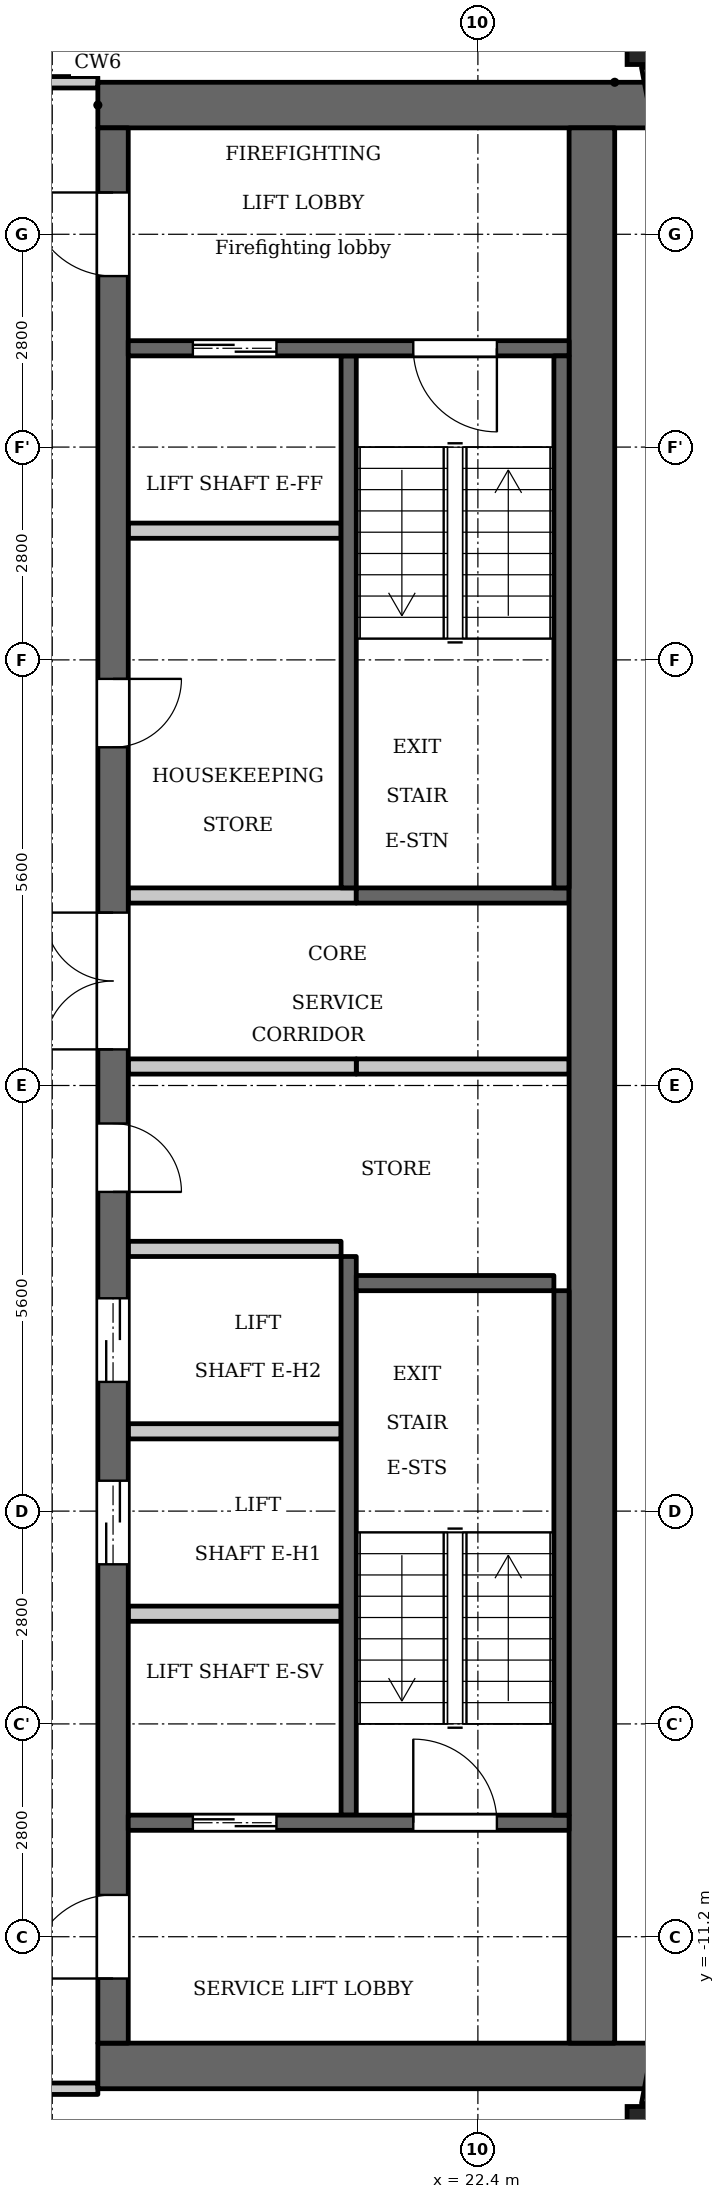
"""IFC4 building model, lengths in metres.
Left out: names, types, materials, properties, quantities, classifications, styles, units other than length and angle.
Written with IfcOpenShell. Run it as: python <this file> out.ifc"""

import sys

from ifc_helpers import new_model, si_unit, direction, frame, frame_2d, origin, origin_2d, place, context, subcontext, project, spatial, rectangle, extrude, element, fill, save


model = new_model("IFC4")
c1 = context("Model", 3, precision=1e-05, world=origin(), true_north=direction((0.0, 1.0)))
c2 = subcontext(c1, "Body", "Model", "MODEL_VIEW")
j1 = project(units=[si_unit("LENGTHUNIT", "METRE"), si_unit("PLANEANGLEUNIT", "RADIAN")], contexts=[c1])
p1 = place(None, origin())
s1 = spatial("IfcSite", under=j1, at=p1, CompositionType="ELEMENT")
p2 = place(p1, origin())
s2 = spatial("IfcBuilding", under=s1, at=p2, CompositionType="ELEMENT")
p3 = place(p2, frame((0.0, 0.0, 269.7)))
s3 = spatial("IfcBuildingStorey", under=s2, at=p3, CompositionType="ELEMENT", Elevation=269.7)
for number, where, z_axis, x_axis in (
    (1, (24.738, -13.809, 0.0), (0.0, 0.0, 1.0), (1.0, 0.0, 0.0)),
    (2, (24.738, 13.809, 0.0), (0.0, 0.0, 1.0), (1.0, 0.0, 0.0)),
):
    element("IfcColumn", number, at=place(p3, frame(where, z_axis=z_axis, x_axis=x_axis)), inside=s3, PredefinedType="COLUMN", context=c2, shape_type="SweptSolid", body=[
        extrude(rectangle(XDim=0.75, YDim=0.75, at=origin_2d()), origin(), (0.0, 0.0, 1.0), 3.5),
    ])
for number, where, z_axis, x_axis in (
    (3, (24.7, -13.42, 0.0), (0.0, 0.0, 1.0), (0.187, 0.982, 0.0)),
    (4, (25.053, 11.572, 0.0), (0.0, 0.0, 1.0), (-0.187, 0.982, 0.0)),
):
    element("IfcWall", number, at=place(p3, frame(where, z_axis=z_axis, x_axis=x_axis)), inside=s3, PredefinedType="SOLIDWALL", context=c2, shape_type="SweptSolid", body=[
        extrude(rectangle(XDim=1.881, YDim=0.3, at=frame_2d((0.941, 0.0))), origin(), (0.0, 0.0, 1.0), 2.55),
    ])
p4 = place(p3, frame((20.7, 2.6, 0.0), z_axis=(0.0, 0.0, 1.0), x_axis=(0.0, 1.0, 0.0)))
e5 = element("IfcWall", 5, at=p4, inside=s3, PredefinedType="SHEAR", context=c2, shape_type="SweptSolid", body=[
    extrude(rectangle(XDim=7.0, YDim=0.2, at=frame_2d((3.5, 0.0))), origin(), (0.0, 0.0, 1.0), 3.2),
])
p5 = place(p3, frame((20.7, -9.6, 0.0), z_axis=(0.0, 0.0, 1.0), x_axis=(0.0, 1.0, 0.0)))
e6 = element("IfcWall", 6, at=p5, inside=s3, PredefinedType="SHEAR", context=c2, shape_type="SweptSolid", body=[
    extrude(rectangle(XDim=7.35, YDim=0.2, at=frame_2d((3.675, 0.0))), origin(), (0.0, 0.0, 1.0), 3.2),
])
p6 = place(p3, frame((20.8, 2.5, 0.0), z_axis=(0.0, 0.0, 1.0), x_axis=(1.0, 0.0, 0.0)))
e7 = element("IfcWall", 7, at=p6, inside=s3, PredefinedType="SHEAR", context=c2, shape_type="SweptSolid", body=[
    extrude(rectangle(XDim=2.8, YDim=0.2, at=frame_2d((1.4, 0.0))), origin(), (0.0, 0.0, 1.0), 3.2),
])
p7 = place(p3, frame((20.8, 0.25, 0.0), z_axis=(0.0, 0.0, 1.0), x_axis=(1.0, 0.0, 0.0)))
e8 = element("IfcWall", 8, at=p7, inside=s3, PredefinedType="PARTITIONING", context=c2, shape_type="SweptSolid", body=[
    extrude(rectangle(XDim=2.8, YDim=0.2, at=frame_2d((1.4, 0.0))), origin(), (0.0, 0.0, 1.0), 3.2),
])
for number, where, z_axis, x_axis in (
    (9, (17.4, 12.9, 0.0), (0.0, 0.0, 1.0), (1.0, 0.0, 0.0)),
    (10, (17.4, -12.9, 0.0), (0.0, 0.0, 1.0), (1.0, 0.0, 0.0)),
):
    element("IfcWall", number, at=place(p3, frame(where, z_axis=z_axis, x_axis=x_axis)), inside=s3, PredefinedType="SHEAR", context=c2, shape_type="SweptSolid", body=[
        extrude(rectangle(XDim=7.32, YDim=0.6, at=frame_2d((3.66, 0.0))), origin(), (0.0, 0.0, 1.0), 3.2),
    ])
p8 = place(p3, frame((17.6, -12.6, 0.0), z_axis=(0.0, 0.0, 1.0), x_axis=(0.0, 1.0, 0.0)))
e11 = element("IfcWall", 11, at=p8, inside=s3, PredefinedType="SHEAR", context=c2, shape_type="SweptSolid", body=[
    extrude(rectangle(XDim=25.2, YDim=0.4, at=frame_2d((12.6, 0.0))), origin(), (0.0, 0.0, 1.0), 3.2),
])
p9 = place(p8, frame((6.3, 0.0, 0.0)))
e12 = element("IfcOpeningElement", 12, at=p9, cuts=e11, PredefinedType="OPENING", context=c2, shape_type="SweptSolid", body=[
    extrude(rectangle(XDim=1.1, YDim=2.1, at=frame_2d((0.55, 1.05))), frame((0.0, 0.21, 0.0), z_axis=(0.0, -1.0, 0.0), x_axis=(1.0, 0.0, 0.0)), (0.0, 0.0, 1.0), 0.42),
])
p10 = place(p8, frame((8.7, 0.0, 0.0)))
e13 = element("IfcOpeningElement", 13, at=p10, cuts=e11, PredefinedType="OPENING", context=c2, shape_type="SweptSolid", body=[
    extrude(rectangle(XDim=1.1, YDim=2.1, at=frame_2d((0.55, 1.05))), frame((0.0, 0.21, 0.0), z_axis=(0.0, -1.0, 0.0), x_axis=(1.0, 0.0, 0.0)), (0.0, 0.0, 1.0), 0.42),
])
p11 = place(p8, frame((11.2, 0.0, 0.0)))
e14 = element("IfcOpeningElement", 14, at=p11, cuts=e11, PredefinedType="OPENING", context=c2, shape_type="SweptSolid", body=[
    extrude(rectangle(XDim=0.9, YDim=2.1, at=frame_2d((0.45, 1.05))), frame((0.0, 0.21, 0.0), z_axis=(0.0, -1.0, 0.0), x_axis=(1.0, 0.0, 0.0)), (0.0, 0.0, 1.0), 0.42),
])
p12 = place(p8, frame((17.05, 0.0, 0.0)))
e15 = element("IfcOpeningElement", 15, at=p12, cuts=e11, PredefinedType="OPENING", context=c2, shape_type="SweptSolid", body=[
    extrude(rectangle(XDim=0.9, YDim=2.1, at=frame_2d((0.45, 1.05))), frame((0.0, 0.21, 0.0), z_axis=(0.0, -1.0, 0.0), x_axis=(1.0, 0.0, 0.0)), (0.0, 0.0, 1.0), 0.42),
])
p13 = place(p8, frame((23.25, 0.0, 0.0)))
e16 = element("IfcOpeningElement", 16, at=p13, cuts=e11, PredefinedType="OPENING", context=c2, shape_type="SweptSolid", body=[
    extrude(rectangle(XDim=1.1, YDim=2.1, at=frame_2d((0.55, 1.05))), frame((0.0, 0.21, 0.0), z_axis=(0.0, -1.0, 0.0), x_axis=(1.0, 0.0, 0.0)), (0.0, 0.0, 1.0), 0.42),
])
p14 = place(p8, frame((0.85, 0.0, 0.0)))
e17 = element("IfcOpeningElement", 17, at=p14, cuts=e11, PredefinedType="OPENING", context=c2, shape_type="SweptSolid", body=[
    extrude(rectangle(XDim=1.1, YDim=2.1, at=frame_2d((0.55, 1.05))), frame((0.0, 0.21, 0.0), z_axis=(0.0, -1.0, 0.0), x_axis=(1.0, 0.0, 0.0)), (0.0, 0.0, 1.0), 0.42),
])
p15 = place(p8, frame((13.075, 0.0, 0.0)))
e18 = element("IfcOpeningElement", 18, at=p15, cuts=e11, PredefinedType="OPENING", context=c2, shape_type="SweptSolid", body=[
    extrude(rectangle(XDim=1.8, YDim=2.1, at=frame_2d((0.9, 1.05))), frame((0.0, 0.21, 0.0), z_axis=(0.0, -1.0, 0.0), x_axis=(1.0, 0.0, 0.0)), (0.0, 0.0, 1.0), 0.42),
])
p16 = place(p3, frame((23.9, -12.6, 0.0), z_axis=(0.0, 0.0, 1.0), x_axis=(0.0, 1.0, 0.0)))
e19 = element("IfcWall", 19, at=p16, inside=s3, PredefinedType="SHEAR", context=c2, shape_type="SweptSolid", body=[
    extrude(rectangle(XDim=25.2, YDim=0.6, at=frame_2d((12.6, 0.0))), origin(), (0.0, 0.0, 1.0), 3.2),
])
p17 = place(p3, frame((17.8, -9.7, 0.0), z_axis=(0.0, 0.0, 1.0), x_axis=(1.0, 0.0, 0.0)))
e20 = element("IfcWall", 20, at=p17, inside=s3, PredefinedType="SHEAR", context=c2, shape_type="SweptSolid", body=[
    extrude(rectangle(XDim=5.8, YDim=0.2, at=frame_2d((2.9, 0.0))), origin(), (0.0, 0.0, 1.0), 3.2),
])
p18 = place(p17, frame((0.85, 0.0, 0.0)))
e21 = element("IfcOpeningElement", 21, at=p18, cuts=e20, PredefinedType="OPENING", context=c2, shape_type="SweptSolid", body=[
    extrude(rectangle(XDim=1.1, YDim=2.1, at=frame_2d((0.55, 1.05))), frame((0.0, 0.11, 0.0), z_axis=(0.0, -1.0, 0.0), x_axis=(1.0, 0.0, 0.0)), (0.0, 0.0, 1.0), 0.22),
])
p19 = place(p17, frame((3.75, 0.0, 0.0)))
e22 = element("IfcOpeningElement", 22, at=p19, cuts=e20, PredefinedType="OPENING", context=c2, shape_type="SweptSolid", body=[
    extrude(rectangle(XDim=1.1, YDim=2.1, at=frame_2d((0.55, 1.05))), frame((0.0, 0.11, 0.0), z_axis=(0.0, -1.0, 0.0), x_axis=(1.0, 0.0, 0.0)), (0.0, 0.0, 1.0), 0.22),
])
for number, where, z_axis, x_axis in (
    (23, (17.8, -6.95, 0.0), (0.0, 0.0, 1.0), (1.0, 0.0, 0.0)),
    (24, (17.8, -4.55, 0.0), (0.0, 0.0, 1.0), (1.0, 0.0, 0.0)),
    (25, (17.8, -2.15, 0.0), (0.0, 0.0, 1.0), (1.0, 0.0, 0.0)),
):
    element("IfcWall", number, at=place(p3, frame(where, z_axis=z_axis, x_axis=x_axis)), inside=s3, PredefinedType="PARTITIONING", context=c2, shape_type="SweptSolid", body=[
        extrude(rectangle(XDim=2.8, YDim=0.2, at=frame_2d((1.4, 0.0))), origin(), (0.0, 0.0, 1.0), 3.2),
    ])
for number, where, z_axis, x_axis in (
    (26, (17.8, 0.25, 0.0), (0.0, 0.0, 1.0), (1.0, 0.0, 0.0)),
    (27, (17.8, 2.5, 0.0), (0.0, 0.0, 1.0), (1.0, 0.0, 0.0)),
):
    element("IfcWall", number, at=place(p3, frame(where, z_axis=z_axis, x_axis=x_axis)), inside=s3, PredefinedType="PARTITIONING", context=c2, shape_type="SweptSolid", body=[
        extrude(rectangle(XDim=3.0, YDim=0.2, at=frame_2d((1.5, 0.0))), origin(), (0.0, 0.0, 1.0), 3.2),
    ])
p20 = place(p3, frame((17.8, 7.3, 0.0), z_axis=(0.0, 0.0, 1.0), x_axis=(1.0, 0.0, 0.0)))
e28 = element("IfcWall", 28, at=p20, inside=s3, PredefinedType="PARTITIONING", context=c2, shape_type="SweptSolid", body=[
    extrude(rectangle(XDim=2.8, YDim=0.2, at=frame_2d((1.4, 0.0))), origin(), (0.0, 0.0, 1.0), 3.2),
])
p21 = place(p3, frame((17.8, 9.7, 0.0), z_axis=(0.0, 0.0, 1.0), x_axis=(1.0, 0.0, 0.0)))
e29 = element("IfcWall", 29, at=p21, inside=s3, PredefinedType="SHEAR", context=c2, shape_type="SweptSolid", body=[
    extrude(rectangle(XDim=5.8, YDim=0.2, at=frame_2d((2.9, 0.0))), origin(), (0.0, 0.0, 1.0), 3.2),
])
p22 = place(p21, frame((0.85, 0.0, 0.0)))
e30 = element("IfcOpeningElement", 30, at=p22, cuts=e29, PredefinedType="OPENING", context=c2, shape_type="SweptSolid", body=[
    extrude(rectangle(XDim=1.1, YDim=2.1, at=frame_2d((0.55, 1.05))), frame((0.0, 0.11, 0.0), z_axis=(0.0, -1.0, 0.0), x_axis=(1.0, 0.0, 0.0)), (0.0, 0.0, 1.0), 0.22),
])
p23 = place(p21, frame((3.75, 0.0, 0.0)))
e31 = element("IfcOpeningElement", 31, at=p23, cuts=e29, PredefinedType="OPENING", context=c2, shape_type="SweptSolid", body=[
    extrude(rectangle(XDim=1.1, YDim=2.1, at=frame_2d((0.55, 1.05))), frame((0.0, 0.11, 0.0), z_axis=(0.0, -1.0, 0.0), x_axis=(1.0, 0.0, 0.0)), (0.0, 0.0, 1.0), 0.22),
])
p24 = place(p3, frame((23.5, 2.6, 0.0), z_axis=(0.0, 0.0, 1.0), x_axis=(0.0, 1.0, 0.0)))
e32 = element("IfcWall", 32, at=p24, inside=s3, PredefinedType="SHEAR", context=c2, shape_type="SweptSolid", body=[
    extrude(rectangle(XDim=7.0, YDim=0.2, at=frame_2d((3.5, 0.0))), origin(), (0.0, 0.0, 1.0), 3.2),
])
p25 = place(p3, frame((23.5, -9.6, 0.0), z_axis=(0.0, 0.0, 1.0), x_axis=(0.0, 1.0, 0.0)))
e33 = element("IfcWall", 33, at=p25, inside=s3, PredefinedType="SHEAR", context=c2, shape_type="SweptSolid", body=[
    extrude(rectangle(XDim=6.9, YDim=0.2, at=frame_2d((3.45, 0.0))), origin(), (0.0, 0.0, 1.0), 3.2),
])
p26 = place(p3, frame((20.8, -2.6, 0.0), z_axis=(0.0, 0.0, 1.0), x_axis=(1.0, 0.0, 0.0)))
e34 = element("IfcWall", 34, at=p26, inside=s3, PredefinedType="SHEAR", context=c2, shape_type="SweptSolid", body=[
    extrude(rectangle(XDim=2.6, YDim=0.2, at=frame_2d((1.3, 0.0))), origin(), (0.0, 0.0, 1.0), 3.2),
])
p27 = place(p3, frame((15.075, -13.2, 0.0), z_axis=(0.0, 0.0, 1.0), x_axis=(1.0, 0.0, 0.0)))
e35 = element("IfcWall", 35, at=p27, inside=s3, PredefinedType="PARTITIONING", context=c2, shape_type="SweptSolid", body=[
    extrude(rectangle(XDim=2.325, YDim=0.15, at=frame_2d((1.163, 0.0))), origin(), (0.0, 0.0, 1.0), 3.2),
])
p28 = place(p27, frame((0.575, 0.0, 0.0)))
e36 = element("IfcOpeningElement", 36, at=p28, cuts=e35, PredefinedType="OPENING", context=c2, shape_type="SweptSolid", body=[
    extrude(rectangle(XDim=1.0, YDim=2.1, at=frame_2d((0.5, 1.05))), frame((0.0, 0.085, 0.0), z_axis=(0.0, -1.0, 0.0), x_axis=(1.0, 0.0, 0.0)), (0.0, 0.0, 1.0), 0.17),
])
p29 = place(p3, frame((15.075, 13.2, 0.0), z_axis=(0.0, 0.0, 1.0), x_axis=(1.0, 0.0, 0.0)))
e37 = element("IfcWall", 37, at=p29, inside=s3, PredefinedType="PARTITIONING", context=c2, shape_type="SweptSolid", body=[
    extrude(rectangle(XDim=2.325, YDim=0.15, at=frame_2d((1.163, 0.0))), origin(), (0.0, 0.0, 1.0), 3.2),
])
p30 = place(p29, frame((0.675, 0.0, 0.0)))
e38 = element("IfcOpeningElement", 38, at=p30, cuts=e37, PredefinedType="OPENING", context=c2, shape_type="SweptSolid", body=[
    extrude(rectangle(XDim=1.0, YDim=2.1, at=frame_2d((0.5, 1.05))), frame((0.0, 0.085, 0.0), z_axis=(0.0, -1.0, 0.0), x_axis=(1.0, 0.0, 0.0)), (0.0, 0.0, 1.0), 0.17),
])
p31 = place(p18, origin())
e39 = element("IfcDoor", 39, at=p31, inside=s3, OperationType="DOUBLE_DOOR_SLIDING", PredefinedType="DOOR", context=c2, shape_type="SweptSolid", body=[
    extrude(rectangle(XDim=1.1, YDim=2.1, at=frame_2d((0.55, 1.05))), frame((0.0, 0.025, 0.0), z_axis=(0.0, -1.0, 0.0), x_axis=(1.0, 0.0, 0.0)), (0.0, 0.0, 1.0), 0.05),
])
fill(e21, e39)
p32 = place(p9, origin())
e40 = element("IfcDoor", 40, at=p32, inside=s3, OperationType="DOUBLE_DOOR_SLIDING", PredefinedType="DOOR", context=c2, shape_type="SweptSolid", body=[
    extrude(rectangle(XDim=1.1, YDim=2.1, at=frame_2d((0.55, 1.05))), frame((0.0, 0.025, 0.0), z_axis=(0.0, -1.0, 0.0), x_axis=(1.0, 0.0, 0.0)), (0.0, 0.0, 1.0), 0.05),
])
fill(e12, e40)
p33 = place(p10, origin())
e41 = element("IfcDoor", 41, at=p33, inside=s3, OperationType="DOUBLE_DOOR_SLIDING", PredefinedType="DOOR", context=c2, shape_type="SweptSolid", body=[
    extrude(rectangle(XDim=1.1, YDim=2.1, at=frame_2d((0.55, 1.05))), frame((0.0, 0.025, 0.0), z_axis=(0.0, -1.0, 0.0), x_axis=(1.0, 0.0, 0.0)), (0.0, 0.0, 1.0), 0.05),
])
fill(e13, e41)
p34 = place(p11, origin())
e42 = element("IfcDoor", 42, at=p34, inside=s3, OperationType="SINGLE_SWING_LEFT", PredefinedType="DOOR", context=c2, shape_type="SweptSolid", body=[
    extrude(rectangle(XDim=0.9, YDim=2.1, at=frame_2d((0.45, 1.05))), frame((0.0, 0.025, 0.0), z_axis=(0.0, -1.0, 0.0), x_axis=(1.0, 0.0, 0.0)), (0.0, 0.0, 1.0), 0.05),
])
fill(e14, e42)
p35 = place(p12, origin())
e43 = element("IfcDoor", 43, at=p35, inside=s3, OperationType="SINGLE_SWING_RIGHT", PredefinedType="DOOR", context=c2, shape_type="SweptSolid", body=[
    extrude(rectangle(XDim=0.9, YDim=2.1, at=frame_2d((0.45, 1.05))), frame((0.0, 0.025, 0.0), z_axis=(0.0, -1.0, 0.0), x_axis=(1.0, 0.0, 0.0)), (0.0, 0.0, 1.0), 0.05),
])
fill(e15, e43)
p36 = place(p22, origin())
e44 = element("IfcDoor", 44, at=p36, inside=s3, OperationType="DOUBLE_DOOR_SLIDING", PredefinedType="DOOR", context=c2, shape_type="SweptSolid", body=[
    extrude(rectangle(XDim=1.1, YDim=2.1, at=frame_2d((0.55, 1.05))), frame((0.0, 0.025, 0.0), z_axis=(0.0, -1.0, 0.0), x_axis=(1.0, 0.0, 0.0)), (0.0, 0.0, 1.0), 0.05),
])
fill(e30, e44)
p37 = place(p13, origin())
e45 = element("IfcDoor", 45, at=p37, inside=s3, OperationType="SINGLE_SWING_LEFT", PredefinedType="DOOR", context=c2, shape_type="SweptSolid", body=[
    extrude(rectangle(XDim=1.1, YDim=2.1, at=frame_2d((0.55, 1.05))), frame((0.0, 0.025, 0.0), z_axis=(0.0, -1.0, 0.0), x_axis=(1.0, 0.0, 0.0)), (0.0, 0.0, 1.0), 0.05),
])
fill(e16, e45)
p38 = place(p14, origin())
e46 = element("IfcDoor", 46, at=p38, inside=s3, OperationType="SINGLE_SWING_RIGHT", PredefinedType="DOOR", context=c2, shape_type="SweptSolid", body=[
    extrude(rectangle(XDim=1.1, YDim=2.1, at=frame_2d((0.55, 1.05))), frame((0.0, 0.025, 0.0), z_axis=(0.0, -1.0, 0.0), x_axis=(1.0, 0.0, 0.0)), (0.0, 0.0, 1.0), 0.05),
])
fill(e17, e46)
p39 = place(p23, origin())
e47 = element("IfcDoor", 47, at=p39, inside=s3, OperationType="SINGLE_SWING_RIGHT", PredefinedType="DOOR", context=c2, shape_type="SweptSolid", body=[
    extrude(rectangle(XDim=1.1, YDim=2.1, at=frame_2d((0.55, 1.05))), frame((0.0, 0.025, 0.0), z_axis=(0.0, -1.0, 0.0), x_axis=(1.0, 0.0, 0.0)), (0.0, 0.0, 1.0), 0.05),
])
fill(e31, e47)
p40 = place(p19, origin())
e48 = element("IfcDoor", 48, at=p40, inside=s3, OperationType="SINGLE_SWING_RIGHT", PredefinedType="DOOR", context=c2, shape_type="SweptSolid", body=[
    extrude(rectangle(XDim=1.1, YDim=2.1, at=frame_2d((0.55, 1.05))), frame((0.0, 0.025, 0.0), z_axis=(0.0, -1.0, 0.0), x_axis=(1.0, 0.0, 0.0)), (0.0, 0.0, 1.0), 0.05),
])
fill(e22, e48)
p41 = place(p15, origin())
e49 = element("IfcDoor", 49, at=p41, inside=s3, OperationType="DOUBLE_DOOR_SINGLE_SWING", PredefinedType="DOOR", context=c2, shape_type="SweptSolid", body=[
    extrude(rectangle(XDim=1.8, YDim=2.1, at=frame_2d((0.9, 1.05))), frame((0.0, 0.025, 0.0), z_axis=(0.0, -1.0, 0.0), x_axis=(1.0, 0.0, 0.0)), (0.0, 0.0, 1.0), 0.05),
])
fill(e18, e49)
save(model, sys.argv[1])
